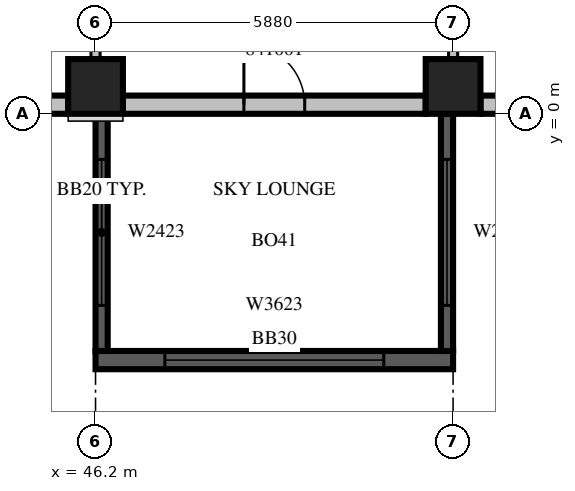
"""IFC4 building model, lengths in metres.
Left out: names, types, materials, properties, quantities, classifications, styles, units other than length and angle.
Written with IfcOpenShell. Run it as: python <this file> out.ifc"""

import sys

from ifc_helpers import new_model, si_unit, direction, frame, frame_2d, origin, origin_2d, place, context, subcontext, project, spatial, rectangle, extrude, source, transform, mapped, element, fill, save


model = new_model("IFC4")
c1 = context("Model", 3, precision=1e-05, world=origin(), true_north=direction((0.0, 1.0)))
c2 = subcontext(c1, "Body", "Model", "MODEL_VIEW")
j1 = project(units=[si_unit("LENGTHUNIT", "METRE"), si_unit("PLANEANGLEUNIT", "RADIAN")], contexts=[c1])
p1 = place(None, origin())
s1 = spatial("IfcSite", under=j1, at=p1, CompositionType="ELEMENT")
p2 = place(p1, origin())
s2 = spatial("IfcBuilding", under=s1, at=p2, CompositionType="ELEMENT")
p3 = place(p2, frame((0.0, 0.0, 189.2)))
s3 = spatial("IfcBuildingStorey", under=s2, at=p3, CompositionType="ELEMENT", Elevation=189.2)
m1 = source(origin(), c2, "Body", "SweptSolid", [
    extrude(rectangle(XDim=0.9, YDim=0.9, at=origin_2d()), origin(), (0.0, 0.0, 1.0), 3.8),
])
for number, where, z_axis, x_axis in (
    (1, (46.2, 0.45, 0.0), (0.0, 0.0, 1.0), (1.0, 0.0, 0.0)),
    (2, (52.08, 0.45, 0.0), (0.0, 0.0, 1.0), (1.0, 0.0, 0.0)),
):
    element("IfcColumn", number, at=place(p3, frame(where, z_axis=z_axis, x_axis=x_axis)), inside=s3, PredefinedType="COLUMN", context=c2, shape_type="MappedRepresentation", body=[
        mapped(m1, transform((0.0, 0.0, 0.0), scale=1.0)),
    ])
m2 = source(origin(), c2, "Body", "SweptSolid", [
    extrude(rectangle(XDim=1.75, YDim=0.3, at=frame_2d((0.875, 0.0))), origin(), (0.0, 0.0, 1.0), 3.4),
])
p4 = place(p3, frame((44.0, 0.15, 0.0), z_axis=(0.0, 0.0, 1.0), x_axis=(1.0, 0.0, 0.0)))
e3 = element("IfcWall", 3, at=p4, inside=s3, PredefinedType="STANDARD", context=c2, shape_type="MappedRepresentation", body=[
    mapped(m2, transform((0.0, 0.0, 0.0), scale=1.0)),
])
m3 = source(origin(), c2, "Body", "SweptSolid", [
    extrude(rectangle(XDim=0.9, YDim=2.3, at=frame_2d((0.45, 1.15))), frame((0.0, 0.16, 0.0), z_axis=(0.0, -1.0, 0.0), x_axis=(1.0, 0.0, 0.0)), (0.0, 0.0, 1.0), 0.32),
])
p5 = place(p4, frame((0.425, 0.0, 0.6)))
e4 = element("IfcOpeningElement", 4, at=p5, cuts=e3, PredefinedType="OPENING", context=c2, shape_type="MappedRepresentation", body=[
    mapped(m3, transform((0.0, 0.0, 0.0), scale=1.0)),
])
m4 = source(origin(), c2, "Body", "SweptSolid", [
    extrude(rectangle(XDim=4.98, YDim=0.3, at=frame_2d((2.49, 0.0))), origin(), (0.0, 0.0, 1.0), 3.4),
])
p6 = place(p3, frame((46.65, 0.15, 0.0), z_axis=(0.0, 0.0, 1.0), x_axis=(1.0, 0.0, 0.0)))
e5 = element("IfcWall", 5, at=p6, inside=s3, PredefinedType="STANDARD", context=c2, shape_type="MappedRepresentation", body=[
    mapped(m4, transform((0.0, 0.0, 0.0), scale=1.0)),
])
m5 = source(origin(), c2, "Body", "SweptSolid", [
    extrude(rectangle(XDim=1.0, YDim=2.1, at=frame_2d((0.5, 1.05))), frame((0.0, 0.16, 0.0), z_axis=(0.0, -1.0, 0.0), x_axis=(1.0, 0.0, 0.0)), (0.0, 0.0, 1.0), 0.32),
])
p7 = place(p6, frame((1.99, 0.0, 0.0)))
e6 = element("IfcOpeningElement", 6, at=p7, cuts=e5, PredefinedType="OPENING", context=c2, shape_type="MappedRepresentation", body=[
    mapped(m5, transform((0.0, 0.0, 0.0), scale=1.0)),
])
m6 = source(origin(), c2, "Body", "SweptSolid", [
    extrude(rectangle(XDim=2.91, YDim=0.3, at=frame_2d((1.455, 0.0))), origin(), (0.0, 0.0, 1.0), 3.4),
])
p8 = place(p3, frame((52.53, 0.15, 0.0), z_axis=(0.0, 0.0, 1.0), x_axis=(1.0, 0.0, 0.0)))
e7 = element("IfcWall", 7, at=p8, inside=s3, PredefinedType="STANDARD", context=c2, shape_type="MappedRepresentation", body=[
    mapped(m6, transform((0.0, 0.0, 0.0), scale=1.0)),
])
m7 = source(origin(), c2, "Body", "SweptSolid", [
    extrude(rectangle(XDim=1.8, YDim=2.3, at=frame_2d((0.9, 1.15))), frame((0.0, 0.16, 0.0), z_axis=(0.0, -1.0, 0.0), x_axis=(1.0, 0.0, 0.0)), (0.0, 0.0, 1.0), 0.32),
])
p9 = place(p8, frame((0.33, 0.0, 0.6)))
e8 = element("IfcOpeningElement", 8, at=p9, cuts=e7, PredefinedType="OPENING", context=c2, shape_type="MappedRepresentation", body=[
    mapped(m7, transform((0.0, 0.0, 0.0), scale=1.0)),
])
m8 = source(origin(), c2, "Body", "SweptSolid", [
    extrude(rectangle(XDim=5.88, YDim=0.3, at=frame_2d((2.94, 0.0))), origin(), (0.0, 0.0, 1.0), 3.39),
])
p10 = place(p3, frame((46.2, -4.05, 0.0), z_axis=(0.0, 0.0, 1.0), x_axis=(1.0, 0.0, 0.0)))
e9 = element("IfcWall", 9, at=p10, inside=s3, PredefinedType="SOLIDWALL", context=c2, shape_type="MappedRepresentation", body=[
    mapped(m8, transform((0.0, 0.0, 0.0), scale=1.0)),
])
m9 = source(origin(), c2, "Body", "SweptSolid", [
    extrude(rectangle(XDim=3.6, YDim=2.3, at=frame_2d((1.8, 1.15))), frame((0.0, 0.16, 0.0), z_axis=(0.0, -1.0, 0.0), x_axis=(1.0, 0.0, 0.0)), (0.0, 0.0, 1.0), 0.32),
])
p11 = place(p10, frame((1.14, 0.0, 0.6)))
e10 = element("IfcOpeningElement", 10, at=p11, cuts=e9, PredefinedType="OPENING", context=c2, shape_type="MappedRepresentation", body=[
    mapped(m9, transform((0.0, 0.0, 0.0), scale=1.0)),
])
m10 = source(origin(), c2, "Body", "SweptSolid", [
    extrude(rectangle(XDim=3.9, YDim=0.2, at=frame_2d((1.95, 0.0))), origin(), (0.0, 0.0, 1.0), 3.39),
])
p12 = place(p3, frame((46.3, 0.0, 0.0), z_axis=(0.0, 0.0, 1.0), x_axis=(0.0, -1.0, 0.0)))
e11 = element("IfcWall", 11, at=p12, inside=s3, PredefinedType="SOLIDWALL", context=c2, shape_type="MappedRepresentation", body=[
    mapped(m10, transform((0.0, 0.0, 0.0), scale=1.0)),
])
m11 = source(origin(), c2, "Body", "SweptSolid", [
    extrude(rectangle(XDim=2.4, YDim=2.3, at=frame_2d((1.2, 1.15))), frame((0.0, 0.11, 0.0), z_axis=(0.0, -1.0, 0.0), x_axis=(1.0, 0.0, 0.0)), (0.0, 0.0, 1.0), 0.22),
])
p13 = place(p12, frame((0.75, 0.0, 0.6)))
e12 = element("IfcOpeningElement", 12, at=p13, cuts=e11, PredefinedType="OPENING", context=c2, shape_type="MappedRepresentation", body=[
    mapped(m11, transform((0.0, 0.0, 0.0), scale=1.0)),
])
p14 = place(p3, frame((51.98, 0.0, 0.0), z_axis=(0.0, 0.0, 1.0), x_axis=(0.0, -1.0, 0.0)))
e13 = element("IfcWall", 13, at=p14, inside=s3, PredefinedType="SOLIDWALL", context=c2, shape_type="MappedRepresentation", body=[
    mapped(m10, transform((0.0, 0.0, 0.0), scale=1.0)),
])
p15 = place(p14, frame((0.75, 0.0, 0.6)))
e14 = element("IfcOpeningElement", 14, at=p15, cuts=e13, PredefinedType="OPENING", context=c2, shape_type="MappedRepresentation", body=[
    mapped(m11, transform((0.0, 0.0, 0.0), scale=1.0)),
])
m12 = source(origin(), c2, "Body", "SweptSolid", [
    extrude(rectangle(XDim=9.152, YDim=0.15, at=frame_2d((4.576, 0.0))), origin(), (0.0, 0.0, 1.0), 3.4),
])
p16 = place(p3, frame((52.08, 0.899, 0.0), z_axis=(0.0, 0.0, 1.0), x_axis=(0.0, 1.0, 0.0)))
e15 = element("IfcWall", 15, at=p16, inside=s3, PredefinedType="PARTITIONING", context=c2, shape_type="MappedRepresentation", body=[
    mapped(m12, transform((0.0, 0.0, 0.0), scale=1.0)),
])
m13 = source(origin(), c2, "Body", "SweptSolid", [
    extrude(rectangle(XDim=1.0, YDim=2.1, at=frame_2d((0.5, 1.05))), frame((0.0, 0.085, 0.0), z_axis=(0.0, -1.0, 0.0), x_axis=(1.0, 0.0, 0.0)), (0.0, 0.0, 1.0), 0.17),
])
p17 = place(p16, frame((5.726, 0.0, 0.0)))
e16 = element("IfcOpeningElement", 16, at=p17, cuts=e15, PredefinedType="OPENING", context=c2, shape_type="MappedRepresentation", body=[
    mapped(m13, transform((0.0, 0.0, 0.0), scale=1.0)),
])
p18 = place(p3, frame((46.2, 0.899, 0.0), z_axis=(0.0, 0.0, 1.0), x_axis=(0.0, 1.0, 0.0)))
e17 = element("IfcWall", 17, at=p18, inside=s3, PredefinedType="PARTITIONING", context=c2, shape_type="MappedRepresentation", body=[
    mapped(m12, transform((0.0, 0.0, 0.0), scale=1.0)),
])
m14 = source(origin(), c2, "Body", "SweptSolid", [
    extrude(rectangle(XDim=3.6, YDim=2.3, at=frame_2d((1.8, 1.15))), frame((0.0, 0.03, 0.0), z_axis=(0.0, -1.0, 0.0), x_axis=(1.0, 0.0, 0.0)), (0.0, 0.0, 1.0), 0.06),
])
p19 = place(p11, origin())
e18 = element("IfcWindow", 18, at=p19, inside=s3, PartitioningType="SINGLE_PANEL", PredefinedType="WINDOW", context=c2, shape_type="MappedRepresentation", body=[
    mapped(m14, transform((0.0, 0.0, 0.0), scale=1.0)),
])
fill(e10, e18)
m15 = source(origin(), c2, "Body", "SweptSolid", [
    extrude(rectangle(XDim=2.4, YDim=2.3, at=frame_2d((1.2, 1.15))), frame((0.0, 0.03, 0.0), z_axis=(0.0, -1.0, 0.0), x_axis=(1.0, 0.0, 0.0)), (0.0, 0.0, 1.0), 0.06),
])
p20 = place(p13, origin())
e19 = element("IfcWindow", 19, at=p20, inside=s3, PartitioningType="SINGLE_PANEL", PredefinedType="WINDOW", context=c2, shape_type="MappedRepresentation", body=[
    mapped(m15, transform((0.0, 0.0, 0.0), scale=1.0)),
])
fill(e12, e19)
p21 = place(p15, origin())
e20 = element("IfcWindow", 20, at=p21, inside=s3, PartitioningType="SINGLE_PANEL", PredefinedType="WINDOW", context=c2, shape_type="MappedRepresentation", body=[
    mapped(m15, transform((0.0, 0.0, 0.0), scale=1.0)),
])
fill(e14, e20)
m16 = source(origin(), c2, "Body", "SweptSolid", [
    extrude(rectangle(XDim=1.0, YDim=2.1, at=frame_2d((0.5, 1.05))), frame((0.0, 0.025, 0.0), z_axis=(0.0, -1.0, 0.0), x_axis=(1.0, 0.0, 0.0)), (0.0, 0.0, 1.0), 0.05),
])
p22 = place(p7, origin())
e21 = element("IfcDoor", 21, at=p22, inside=s3, OperationType="SINGLE_SWING_LEFT", PredefinedType="DOOR", context=c2, shape_type="MappedRepresentation", body=[
    mapped(m16, transform((0.0, 0.0, 0.0), scale=1.0)),
])
fill(e6, e21)
save(model, sys.argv[1])
